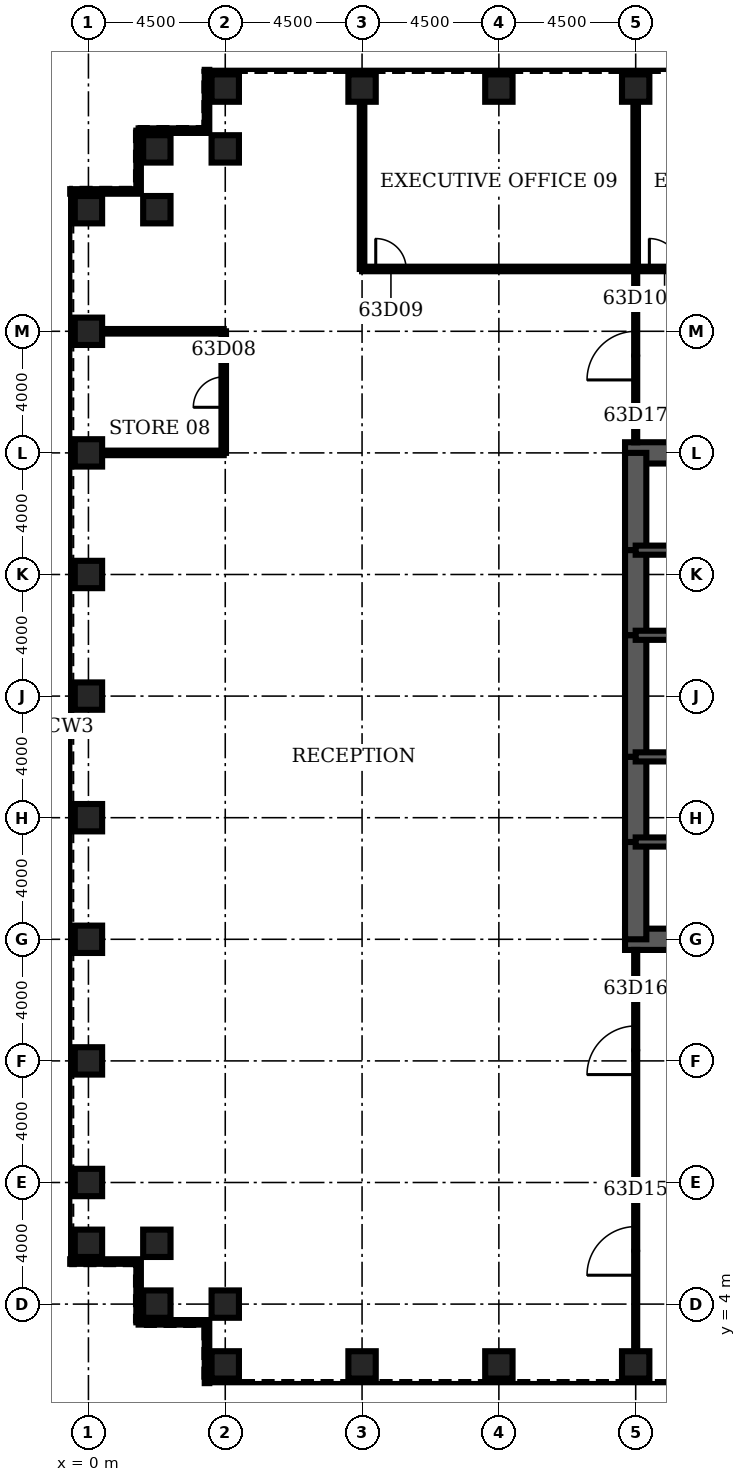
"""IFC4 building model, lengths in metres.
Left out: names, types, materials, properties, quantities, classifications, styles, units other than length and angle.
Written with IfcOpenShell. Run it as: python <this file> out.ifc"""

import sys

from ifc_helpers import new_model, si_unit, direction, frame, frame_2d, origin, origin_2d, place, context, subcontext, project, spatial, rectangle, hollow_rectangle, extrude, element, fill, save


model = new_model("IFC4")
c1 = context("Model", 3, precision=1e-05, world=origin(), true_north=direction((0.0, 1.0)))
c2 = subcontext(c1, "Body", "Model", "MODEL_VIEW")
j1 = project(units=[si_unit("LENGTHUNIT", "METRE"), si_unit("PLANEANGLEUNIT", "RADIAN")], contexts=[c1])
p1 = place(None, origin())
s1 = spatial("IfcSite", under=j1, at=p1, CompositionType="ELEMENT")
p2 = place(p1, origin())
s2 = spatial("IfcBuilding", under=s1, at=p2, CompositionType="ELEMENT")
p3 = place(p2, frame((0.0, 0.0, 279.5)))
s3 = spatial("IfcBuildingStorey", under=s2, at=p3, CompositionType="ELEMENT", Elevation=279.5)
for number, where, z_axis, x_axis in (
    (1, (4.5, 2.0, 0.0), (0.0, 0.0, 1.0), (0.0, 1.0, 0.0)),
    (2, (9.0, 2.0, 0.0), (0.0, 0.0, 1.0), (0.0, 1.0, 0.0)),
    (3, (13.5, 2.0, 0.0), (0.0, 0.0, 1.0), (0.0, 1.0, 0.0)),
    (4, (18.0, 2.0, 0.0), (0.0, 0.0, 1.0), (0.0, 1.0, 0.0)),
    (5, (18.0, 44.0, 0.0), (0.0, 0.0, 1.0), (0.0, 1.0, 0.0)),
    (6, (13.5, 44.0, 0.0), (0.0, 0.0, 1.0), (0.0, 1.0, 0.0)),
    (7, (9.0, 44.0, 0.0), (0.0, 0.0, 1.0), (0.0, 1.0, 0.0)),
    (8, (4.5, 44.0, 0.0), (0.0, 0.0, 1.0), (0.0, 1.0, 0.0)),
    (9, (4.5, 42.0, 0.0), (0.0, 0.0, 1.0), (0.0, 1.0, 0.0)),
    (10, (2.25, 42.0, 0.0), (0.0, 0.0, 1.0), (1.0, 0.0, 0.0)),
    (11, (2.25, 40.0, 0.0), (0.0, 0.0, 1.0), (1.0, 0.0, 0.0)),
    (12, (0.0, 40.0, 0.0), (0.0, 0.0, 1.0), (1.0, 0.0, 0.0)),
    (13, (0.0, 36.0, 0.0), (0.0, 0.0, 1.0), (1.0, 0.0, 0.0)),
    (14, (0.0, 32.0, 0.0), (0.0, 0.0, 1.0), (1.0, 0.0, 0.0)),
    (15, (0.0, 28.0, 0.0), (0.0, 0.0, 1.0), (1.0, 0.0, 0.0)),
    (16, (0.0, 24.0, 0.0), (0.0, 0.0, 1.0), (1.0, 0.0, 0.0)),
    (17, (0.0, 20.0, 0.0), (0.0, 0.0, 1.0), (1.0, 0.0, 0.0)),
    (18, (0.0, 16.0, 0.0), (0.0, 0.0, 1.0), (1.0, 0.0, 0.0)),
    (19, (0.0, 12.0, 0.0), (0.0, 0.0, 1.0), (1.0, 0.0, 0.0)),
    (20, (0.0, 8.0, 0.0), (0.0, 0.0, 1.0), (1.0, 0.0, 0.0)),
    (21, (0.0, 6.0, 0.0), (0.0, 0.0, 1.0), (1.0, 0.0, 0.0)),
    (22, (2.25, 6.0, 0.0), (0.0, 0.0, 1.0), (1.0, 0.0, 0.0)),
    (23, (2.25, 4.0, 0.0), (0.0, 0.0, 1.0), (1.0, 0.0, 0.0)),
    (24, (4.5, 4.0, 0.0), (0.0, 0.0, 1.0), (0.0, 1.0, 0.0)),
):
    element("IfcColumn", number, at=place(p3, frame(where, z_axis=z_axis, x_axis=x_axis)), inside=s3, PredefinedType="COLUMN", context=c2, shape_type="SweptSolid", body=[
        extrude(hollow_rectangle(XDim=0.9, YDim=0.9, WallThickness=0.07, at=origin_2d()), origin(), (0.0, 0.0, 1.0), 4.2),
    ])
for number, where, z_axis, x_axis in (
    (25, (17.65, 16.0, 0.0), (0.0, 0.0, 1.0), (1.0, 0.0, 0.0)),
    (26, (27.0, 32.0, 0.0), (0.0, 0.0, 1.0), (-1.0, 0.0, 0.0)),
):
    element("IfcWall", number, at=place(p3, frame(where, z_axis=z_axis, x_axis=x_axis)), inside=s3, PredefinedType="SHEAR", context=c2, shape_type="SweptSolid", body=[
        extrude(rectangle(XDim=9.35, YDim=0.7, at=frame_2d((4.675, 0.0))), origin(), (0.0, 0.0, 1.0), 4.2),
    ])
p4 = place(p3, frame((18.0, 32.0, 0.0), z_axis=(0.0, 0.0, 1.0), x_axis=(0.0, -1.0, 0.0)))
e27 = element("IfcWall", 27, at=p4, inside=s3, PredefinedType="SHEAR", context=c2, shape_type="SweptSolid", body=[
    extrude(rectangle(XDim=3.2, YDim=0.7, at=frame_2d((1.6, 0.0))), origin(), (0.0, 0.0, 1.0), 4.2),
])
p5 = place(p3, frame((18.0, 28.8, 0.0), z_axis=(0.0, 0.0, 1.0), x_axis=(0.0, -1.0, 0.0)))
e28 = element("IfcWall", 28, at=p5, inside=s3, PredefinedType="SHEAR", context=c2, shape_type="SweptSolid", body=[
    extrude(rectangle(XDim=2.8, YDim=0.7, at=frame_2d((1.4, 0.0))), origin(), (0.0, 0.0, 1.0), 4.2),
])
p6 = place(p5, frame((0.4, 0.0, 0.0)))
e29 = element("IfcOpeningElement", 29, at=p6, cuts=e28, PredefinedType="OPENING", context=c2, shape_type="SweptSolid", body=[
    extrude(rectangle(XDim=1.8, YDim=2.1, at=frame_2d((0.9, 1.05))), frame((0.0, 0.36, 0.0), z_axis=(0.0, -1.0, 0.0), x_axis=(1.0, 0.0, 0.0)), (0.0, 0.0, 1.0), 0.72),
])
p7 = place(p3, frame((18.0, 26.0, 0.0), z_axis=(0.0, 0.0, 1.0), x_axis=(0.0, -1.0, 0.0)))
e30 = element("IfcWall", 30, at=p7, inside=s3, PredefinedType="SHEAR", context=c2, shape_type="SweptSolid", body=[
    extrude(rectangle(XDim=4.0, YDim=0.7, at=frame_2d((2.0, 0.0))), origin(), (0.0, 0.0, 1.0), 4.2),
])
p8 = place(p3, frame((18.0, 22.0, 0.0), z_axis=(0.0, 0.0, 1.0), x_axis=(0.0, -1.0, 0.0)))
e31 = element("IfcWall", 31, at=p8, inside=s3, PredefinedType="SHEAR", context=c2, shape_type="SweptSolid", body=[
    extrude(rectangle(XDim=2.8, YDim=0.7, at=frame_2d((1.4, 0.0))), origin(), (0.0, 0.0, 1.0), 4.2),
])
p9 = place(p8, frame((0.6, 0.0, 0.0)))
e32 = element("IfcOpeningElement", 32, at=p9, cuts=e31, PredefinedType="OPENING", context=c2, shape_type="SweptSolid", body=[
    extrude(rectangle(XDim=1.8, YDim=2.1, at=frame_2d((0.9, 1.05))), frame((0.0, 0.36, 0.0), z_axis=(0.0, -1.0, 0.0), x_axis=(1.0, 0.0, 0.0)), (0.0, 0.0, 1.0), 0.72),
])
p10 = place(p3, frame((18.0, 19.2, 0.0), z_axis=(0.0, 0.0, 1.0), x_axis=(0.0, -1.0, 0.0)))
e33 = element("IfcWall", 33, at=p10, inside=s3, PredefinedType="SHEAR", context=c2, shape_type="SweptSolid", body=[
    extrude(rectangle(XDim=3.2, YDim=0.7, at=frame_2d((1.6, 0.0))), origin(), (0.0, 0.0, 1.0), 4.2),
])
p11 = place(p3, frame((18.0, 19.2, 0.0), z_axis=(0.0, 0.0, 1.0), x_axis=(1.0, 0.0, 0.0)))
e34 = element("IfcWall", 34, at=p11, inside=s3, PredefinedType="SOLIDWALL", context=c2, shape_type="SweptSolid", body=[
    extrude(rectangle(XDim=9.0, YDim=0.3, at=frame_2d((4.5, 0.0))), origin(), (0.0, 0.0, 1.0), 4.2),
])
p12 = place(p11, frame((0.65, 0.0, 0.0)))
e35 = element("IfcOpeningElement", 35, at=p12, cuts=e34, PredefinedType="OPENING", context=c2, shape_type="SweptSolid", body=[
    extrude(rectangle(XDim=1.0, YDim=2.1, at=frame_2d((0.5, 1.05))), frame((0.0, 0.16, 0.0), z_axis=(0.0, -1.0, 0.0), x_axis=(1.0, 0.0, 0.0)), (0.0, 0.0, 1.0), 0.32),
])
p13 = place(p3, frame((18.0, 28.8, 0.0), z_axis=(0.0, 0.0, 1.0), x_axis=(1.0, 0.0, 0.0)))
e36 = element("IfcWall", 36, at=p13, inside=s3, PredefinedType="SOLIDWALL", context=c2, shape_type="SweptSolid", body=[
    extrude(rectangle(XDim=9.0, YDim=0.3, at=frame_2d((4.5, 0.0))), origin(), (0.0, 0.0, 1.0), 4.2),
])
p14 = place(p13, frame((0.65, 0.0, 0.0)))
e37 = element("IfcOpeningElement", 37, at=p14, cuts=e36, PredefinedType="OPENING", context=c2, shape_type="SweptSolid", body=[
    extrude(rectangle(XDim=1.0, YDim=2.1, at=frame_2d((0.5, 1.05))), frame((0.0, 0.16, 0.0), z_axis=(0.0, -1.0, 0.0), x_axis=(1.0, 0.0, 0.0)), (0.0, 0.0, 1.0), 0.32),
])
p15 = place(p3, frame((18.0, 22.0, 0.0), z_axis=(0.0, 0.0, 1.0), x_axis=(1.0, 0.0, 0.0)))
e38 = element("IfcWall", 38, at=p15, inside=s3, PredefinedType="SOLIDWALL", context=c2, shape_type="SweptSolid", body=[
    extrude(rectangle(XDim=6.0, YDim=0.3, at=frame_2d((3.0, 0.0))), origin(), (0.0, 0.0, 1.0), 4.2),
])
p16 = place(p15, frame((2.0, 0.0, 0.0)))
e39 = element("IfcOpeningElement", 39, at=p16, cuts=e38, PredefinedType="OPENING", context=c2, shape_type="SweptSolid", body=[
    extrude(rectangle(XDim=1.0, YDim=2.1, at=frame_2d((0.5, 1.05))), frame((0.0, 0.16, 0.0), z_axis=(0.0, -1.0, 0.0), x_axis=(1.0, 0.0, 0.0)), (0.0, 0.0, 1.0), 0.32),
])
p17 = place(p3, frame((18.0, 26.0, 0.0), z_axis=(0.0, 0.0, 1.0), x_axis=(1.0, 0.0, 0.0)))
e40 = element("IfcWall", 40, at=p17, inside=s3, PredefinedType="SOLIDWALL", context=c2, shape_type="SweptSolid", body=[
    extrude(rectangle(XDim=6.0, YDim=0.3, at=frame_2d((3.0, 0.0))), origin(), (0.0, 0.0, 1.0), 4.2),
])
for number, where, z_axis, x_axis in (
    (41, (0.45, 32.0, 0.0), (0.0, 0.0, 1.0), (1.0, 0.0, 0.0)),
    (42, (0.45, 36.0, 0.0), (0.0, 0.0, 1.0), (1.0, 0.0, 0.0)),
):
    element("IfcWall", number, at=place(p3, frame(where, z_axis=z_axis, x_axis=x_axis)), inside=s3, PredefinedType="PARTITIONING", context=c2, shape_type="SweptSolid", body=[
        extrude(rectangle(XDim=4.0, YDim=0.15, at=frame_2d((2.0, 0.0))), origin(), (0.0, 0.0, 1.0), 3.0),
    ])
p18 = place(p3, frame((9.0, 38.05, 0.0), z_axis=(0.0, 0.0, 1.0), x_axis=(1.0, 0.0, 0.0)))
e43 = element("IfcWall", 43, at=p18, inside=s3, PredefinedType="PARTITIONING", context=c2, shape_type="SweptSolid", body=[
    extrude(rectangle(XDim=54.0, YDim=0.15, at=frame_2d((27.0, 0.0))), origin(), (0.0, 0.0, 1.0), 3.0),
])
p19 = place(p18, frame((0.45, 0.0, 0.0)))
e44 = element("IfcOpeningElement", 44, at=p19, cuts=e43, PredefinedType="OPENING", context=c2, shape_type="SweptSolid", body=[
    extrude(rectangle(XDim=1.0, YDim=2.1, at=frame_2d((0.5, 1.05))), frame((0.0, 0.085, 0.0), z_axis=(0.0, -1.0, 0.0), x_axis=(1.0, 0.0, 0.0)), (0.0, 0.0, 1.0), 0.17),
])
p20 = place(p18, frame((9.45, 0.0, 0.0)))
e45 = element("IfcOpeningElement", 45, at=p20, cuts=e43, PredefinedType="OPENING", context=c2, shape_type="SweptSolid", body=[
    extrude(rectangle(XDim=1.0, YDim=2.1, at=frame_2d((0.5, 1.05))), frame((0.0, 0.085, 0.0), z_axis=(0.0, -1.0, 0.0), x_axis=(1.0, 0.0, 0.0)), (0.0, 0.0, 1.0), 0.17),
])
p21 = place(p18, frame((18.45, 0.0, 0.0)))
e46 = element("IfcOpeningElement", 46, at=p21, cuts=e43, PredefinedType="OPENING", context=c2, shape_type="SweptSolid", body=[
    extrude(rectangle(XDim=1.0, YDim=2.1, at=frame_2d((0.5, 1.05))), frame((0.0, 0.085, 0.0), z_axis=(0.0, -1.0, 0.0), x_axis=(1.0, 0.0, 0.0)), (0.0, 0.0, 1.0), 0.17),
])
p22 = place(p18, frame((27.45, 0.0, 0.0)))
e47 = element("IfcOpeningElement", 47, at=p22, cuts=e43, PredefinedType="OPENING", context=c2, shape_type="SweptSolid", body=[
    extrude(rectangle(XDim=1.0, YDim=2.1, at=frame_2d((0.5, 1.05))), frame((0.0, 0.085, 0.0), z_axis=(0.0, -1.0, 0.0), x_axis=(1.0, 0.0, 0.0)), (0.0, 0.0, 1.0), 0.17),
])
p23 = place(p18, frame((36.45, 0.0, 0.0)))
e48 = element("IfcOpeningElement", 48, at=p23, cuts=e43, PredefinedType="OPENING", context=c2, shape_type="SweptSolid", body=[
    extrude(rectangle(XDim=1.0, YDim=2.1, at=frame_2d((0.5, 1.05))), frame((0.0, 0.085, 0.0), z_axis=(0.0, -1.0, 0.0), x_axis=(1.0, 0.0, 0.0)), (0.0, 0.0, 1.0), 0.17),
])
p24 = place(p18, frame((45.45, 0.0, 0.0)))
e49 = element("IfcOpeningElement", 49, at=p24, cuts=e43, PredefinedType="OPENING", context=c2, shape_type="SweptSolid", body=[
    extrude(rectangle(XDim=1.0, YDim=2.1, at=frame_2d((0.5, 1.05))), frame((0.0, 0.085, 0.0), z_axis=(0.0, -1.0, 0.0), x_axis=(1.0, 0.0, 0.0)), (0.0, 0.0, 1.0), 0.17),
])
p25 = place(p3, frame((4.45, 32.0, 0.0), z_axis=(0.0, 0.0, 1.0), x_axis=(0.0, 1.0, 0.0)))
e50 = element("IfcWall", 50, at=p25, inside=s3, PredefinedType="PARTITIONING", context=c2, shape_type="SweptSolid", body=[
    extrude(rectangle(XDim=4.0, YDim=0.15, at=frame_2d((2.0, 0.0))), origin(), (0.0, 0.0, 1.0), 3.0),
])
p26 = place(p25, frame((1.5, 0.0, 0.0)))
e51 = element("IfcOpeningElement", 51, at=p26, cuts=e50, PredefinedType="OPENING", context=c2, shape_type="SweptSolid", body=[
    extrude(rectangle(XDim=1.0, YDim=2.1, at=frame_2d((0.5, 1.05))), frame((0.0, 0.085, 0.0), z_axis=(0.0, -1.0, 0.0), x_axis=(1.0, 0.0, 0.0)), (0.0, 0.0, 1.0), 0.17),
])
p27 = place(p3, frame((9.0, 38.05, 0.0), z_axis=(0.0, 0.0, 1.0), x_axis=(0.0, 1.0, 0.0)))
e52 = element("IfcWall", 52, at=p27, inside=s3, PredefinedType="PARTITIONING", context=c2, shape_type="SweptSolid", body=[
    extrude(rectangle(XDim=5.5, YDim=0.15, at=frame_2d((2.75, 0.0))), origin(), (0.0, 0.0, 1.0), 3.0),
])
p28 = place(p3, frame((18.0, 2.45, 0.0), z_axis=(0.0, 0.0, 1.0), x_axis=(0.0, 1.0, 0.0)))
e53 = element("IfcWall", 53, at=p28, inside=s3, PredefinedType="PARTITIONING", context=c2, shape_type="SweptSolid", body=[
    extrude(rectangle(XDim=13.2, YDim=0.1, at=frame_2d((6.6, 0.0))), origin(), (0.0, 0.0, 1.0), 3.0),
])
p29 = place(p28, frame((2.5, 0.0, 0.0)))
e54 = element("IfcOpeningElement", 54, at=p29, cuts=e53, PredefinedType="OPENING", context=c2, shape_type="SweptSolid", body=[
    extrude(rectangle(XDim=1.6, YDim=2.1, at=frame_2d((0.8, 1.05))), frame((0.0, 0.06, 0.0), z_axis=(0.0, -1.0, 0.0), x_axis=(1.0, 0.0, 0.0)), (0.0, 0.0, 1.0), 0.12),
])
p30 = place(p28, frame((9.1, 0.0, 0.0)))
e55 = element("IfcOpeningElement", 55, at=p30, cuts=e53, PredefinedType="OPENING", context=c2, shape_type="SweptSolid", body=[
    extrude(rectangle(XDim=1.6, YDim=2.1, at=frame_2d((0.8, 1.05))), frame((0.0, 0.06, 0.0), z_axis=(0.0, -1.0, 0.0), x_axis=(1.0, 0.0, 0.0)), (0.0, 0.0, 1.0), 0.12),
])
p31 = place(p3, frame((18.0, 32.35, 0.0), z_axis=(0.0, 0.0, 1.0), x_axis=(0.0, 1.0, 0.0)))
e56 = element("IfcWall", 56, at=p31, inside=s3, PredefinedType="PARTITIONING", context=c2, shape_type="SweptSolid", body=[
    extrude(rectangle(XDim=5.7, YDim=0.1, at=frame_2d((2.85, 0.0))), origin(), (0.0, 0.0, 1.0), 3.0),
])
p32 = place(p31, frame((2.05, 0.0, 0.0)))
e57 = element("IfcOpeningElement", 57, at=p32, cuts=e56, PredefinedType="OPENING", context=c2, shape_type="SweptSolid", body=[
    extrude(rectangle(XDim=1.6, YDim=2.1, at=frame_2d((0.8, 1.05))), frame((0.0, 0.06, 0.0), z_axis=(0.0, -1.0, 0.0), x_axis=(1.0, 0.0, 0.0)), (0.0, 0.0, 1.0), 0.12),
])
p33 = place(p3, frame((18.0, 38.05, 0.0), z_axis=(0.0, 0.0, 1.0), x_axis=(0.0, 1.0, 0.0)))
e58 = element("IfcWall", 58, at=p33, inside=s3, PredefinedType="PARTITIONING", context=c2, shape_type="SweptSolid", body=[
    extrude(rectangle(XDim=5.5, YDim=0.15, at=frame_2d((2.75, 0.0))), origin(), (0.0, 0.0, 1.0), 3.0),
])
p34 = place(p3, frame((3.9, 44.6, 0.0), z_axis=(0.0, 0.0, 1.0), x_axis=(0.0, -1.0, 0.0)))
e59 = element("IfcWall", 59, at=p34, inside=s3, PredefinedType="ELEMENTEDWALL", context=c2, shape_type="SweptSolid", body=[
    extrude(rectangle(XDim=2.0, YDim=0.15, at=frame_2d((1.0, 0.0))), origin(), (0.0, 0.0, 1.0), 4.04),
])
p35 = place(p3, frame((3.9, 42.6, 0.0), z_axis=(0.0, 0.0, 1.0), x_axis=(-1.0, 0.0, 0.0)))
e60 = element("IfcWall", 60, at=p35, inside=s3, PredefinedType="ELEMENTEDWALL", context=c2, shape_type="SweptSolid", body=[
    extrude(rectangle(XDim=2.25, YDim=0.15, at=frame_2d((1.125, 0.0))), origin(), (0.0, 0.0, 1.0), 4.04),
])
p36 = place(p3, frame((1.65, 42.6, 0.0), z_axis=(0.0, 0.0, 1.0), x_axis=(0.0, -1.0, 0.0)))
e61 = element("IfcWall", 61, at=p36, inside=s3, PredefinedType="ELEMENTEDWALL", context=c2, shape_type="SweptSolid", body=[
    extrude(rectangle(XDim=2.0, YDim=0.15, at=frame_2d((1.0, 0.0))), origin(), (0.0, 0.0, 1.0), 4.04),
])
for number, where, z_axis, x_axis in (
    (62, (1.65, 40.6, 0.0), (0.0, 0.0, 1.0), (-1.0, 0.0, 0.0)),
    (63, (-0.6, 5.4, 0.0), (0.0, 0.0, 1.0), (1.0, 0.0, 0.0)),
):
    element("IfcWall", number, at=place(p3, frame(where, z_axis=z_axis, x_axis=x_axis)), inside=s3, PredefinedType="ELEMENTEDWALL", context=c2, shape_type="SweptSolid", body=[
        extrude(rectangle(XDim=2.25, YDim=0.15, at=frame_2d((1.125, 0.0))), origin(), (0.0, 0.0, 1.0), 4.04),
    ])
p37 = place(p3, frame((1.65, 5.4, 0.0), z_axis=(0.0, 0.0, 1.0), x_axis=(0.0, -1.0, 0.0)))
e64 = element("IfcWall", 64, at=p37, inside=s3, PredefinedType="ELEMENTEDWALL", context=c2, shape_type="SweptSolid", body=[
    extrude(rectangle(XDim=2.0, YDim=0.15, at=frame_2d((1.0, 0.0))), origin(), (0.0, 0.0, 1.0), 4.04),
])
p38 = place(p3, frame((1.65, 3.4, 0.0), z_axis=(0.0, 0.0, 1.0), x_axis=(1.0, 0.0, 0.0)))
e65 = element("IfcWall", 65, at=p38, inside=s3, PredefinedType="ELEMENTEDWALL", context=c2, shape_type="SweptSolid", body=[
    extrude(rectangle(XDim=2.25, YDim=0.15, at=frame_2d((1.125, 0.0))), origin(), (0.0, 0.0, 1.0), 4.04),
])
p39 = place(p3, frame((3.9, 3.4, 0.0), z_axis=(0.0, 0.0, 1.0), x_axis=(0.0, -1.0, 0.0)))
e66 = element("IfcWall", 66, at=p39, inside=s3, PredefinedType="ELEMENTEDWALL", context=c2, shape_type="SweptSolid", body=[
    extrude(rectangle(XDim=2.0, YDim=0.15, at=frame_2d((1.0, 0.0))), origin(), (0.0, 0.0, 1.0), 4.04),
])
p40 = place(p26, origin())
e67 = element("IfcDoor", 67, at=p40, inside=s3, OperationType="SINGLE_SWING_LEFT", PredefinedType="DOOR", context=c2, shape_type="SweptSolid", body=[
    extrude(rectangle(XDim=1.0, YDim=2.1, at=frame_2d((0.5, 1.05))), frame((0.0, 0.025, 0.0), z_axis=(0.0, -1.0, 0.0), x_axis=(1.0, 0.0, 0.0)), (0.0, 0.0, 1.0), 0.05),
])
fill(e51, e67)
p41 = place(p19, origin())
e68 = element("IfcDoor", 68, at=p41, inside=s3, OperationType="SINGLE_SWING_LEFT", PredefinedType="DOOR", context=c2, shape_type="SweptSolid", body=[
    extrude(rectangle(XDim=1.0, YDim=2.1, at=frame_2d((0.5, 1.05))), frame((0.0, 0.025, 0.0), z_axis=(0.0, -1.0, 0.0), x_axis=(1.0, 0.0, 0.0)), (0.0, 0.0, 1.0), 0.05),
])
fill(e44, e68)
p42 = place(p20, origin())
e69 = element("IfcDoor", 69, at=p42, inside=s3, OperationType="SINGLE_SWING_LEFT", PredefinedType="DOOR", context=c2, shape_type="SweptSolid", body=[
    extrude(rectangle(XDim=1.0, YDim=2.1, at=frame_2d((0.5, 1.05))), frame((0.0, 0.025, 0.0), z_axis=(0.0, -1.0, 0.0), x_axis=(1.0, 0.0, 0.0)), (0.0, 0.0, 1.0), 0.05),
])
fill(e45, e69)
p43 = place(p29, origin())
e70 = element("IfcDoor", 70, at=p43, inside=s3, OperationType="SINGLE_SWING_LEFT", PredefinedType="DOOR", context=c2, shape_type="SweptSolid", body=[
    extrude(rectangle(XDim=1.6, YDim=2.1, at=frame_2d((0.8, 1.05))), frame((0.0, 0.025, 0.0), z_axis=(0.0, -1.0, 0.0), x_axis=(1.0, 0.0, 0.0)), (0.0, 0.0, 1.0), 0.05),
])
fill(e54, e70)
p44 = place(p30, origin())
e71 = element("IfcDoor", 71, at=p44, inside=s3, OperationType="SINGLE_SWING_LEFT", PredefinedType="DOOR", context=c2, shape_type="SweptSolid", body=[
    extrude(rectangle(XDim=1.6, YDim=2.1, at=frame_2d((0.8, 1.05))), frame((0.0, 0.025, 0.0), z_axis=(0.0, -1.0, 0.0), x_axis=(1.0, 0.0, 0.0)), (0.0, 0.0, 1.0), 0.05),
])
fill(e55, e71)
p45 = place(p32, origin())
e72 = element("IfcDoor", 72, at=p45, inside=s3, OperationType="SINGLE_SWING_LEFT", PredefinedType="DOOR", context=c2, shape_type="SweptSolid", body=[
    extrude(rectangle(XDim=1.6, YDim=2.1, at=frame_2d((0.8, 1.05))), frame((0.0, 0.025, 0.0), z_axis=(0.0, -1.0, 0.0), x_axis=(1.0, 0.0, 0.0)), (0.0, 0.0, 1.0), 0.05),
])
fill(e57, e72)
p46 = place(p12, origin())
e73 = element("IfcDoor", 73, at=p46, inside=s3, OperationType="SINGLE_SWING_LEFT", PredefinedType="DOOR", context=c2, shape_type="SweptSolid", body=[
    extrude(rectangle(XDim=1.0, YDim=2.1, at=frame_2d((0.5, 1.05))), frame((0.0, 0.025, 0.0), z_axis=(0.0, -1.0, 0.0), x_axis=(1.0, 0.0, 0.0)), (0.0, 0.0, 1.0), 0.05),
])
fill(e35, e73)
p47 = place(p14, origin())
e74 = element("IfcDoor", 74, at=p47, inside=s3, OperationType="SINGLE_SWING_LEFT", PredefinedType="DOOR", context=c2, shape_type="SweptSolid", body=[
    extrude(rectangle(XDim=1.0, YDim=2.1, at=frame_2d((0.5, 1.05))), frame((0.0, 0.025, 0.0), z_axis=(0.0, -1.0, 0.0), x_axis=(1.0, 0.0, 0.0)), (0.0, 0.0, 1.0), 0.05),
])
fill(e37, e74)
p48 = place(p9, origin())
e75 = element("IfcDoor", 75, at=p48, inside=s3, OperationType="SINGLE_SWING_LEFT", PredefinedType="DOOR", context=c2, shape_type="SweptSolid", body=[
    extrude(rectangle(XDim=1.8, YDim=2.1, at=frame_2d((0.9, 1.05))), frame((0.0, 0.35, 0.0), z_axis=(0.0, -1.0, 0.0), x_axis=(1.0, 0.0, 0.0)), (0.0, 0.0, 1.0), 0.699),
])
fill(e32, e75)
p49 = place(p6, origin())
e76 = element("IfcDoor", 76, at=p49, inside=s3, OperationType="SINGLE_SWING_LEFT", PredefinedType="DOOR", context=c2, shape_type="SweptSolid", body=[
    extrude(rectangle(XDim=1.8, YDim=2.1, at=frame_2d((0.9, 1.05))), frame((0.0, 0.35, 0.0), z_axis=(0.0, -1.0, 0.0), x_axis=(1.0, 0.0, 0.0)), (0.0, 0.0, 1.0), 0.699),
])
fill(e29, e76)
save(model, sys.argv[1])
